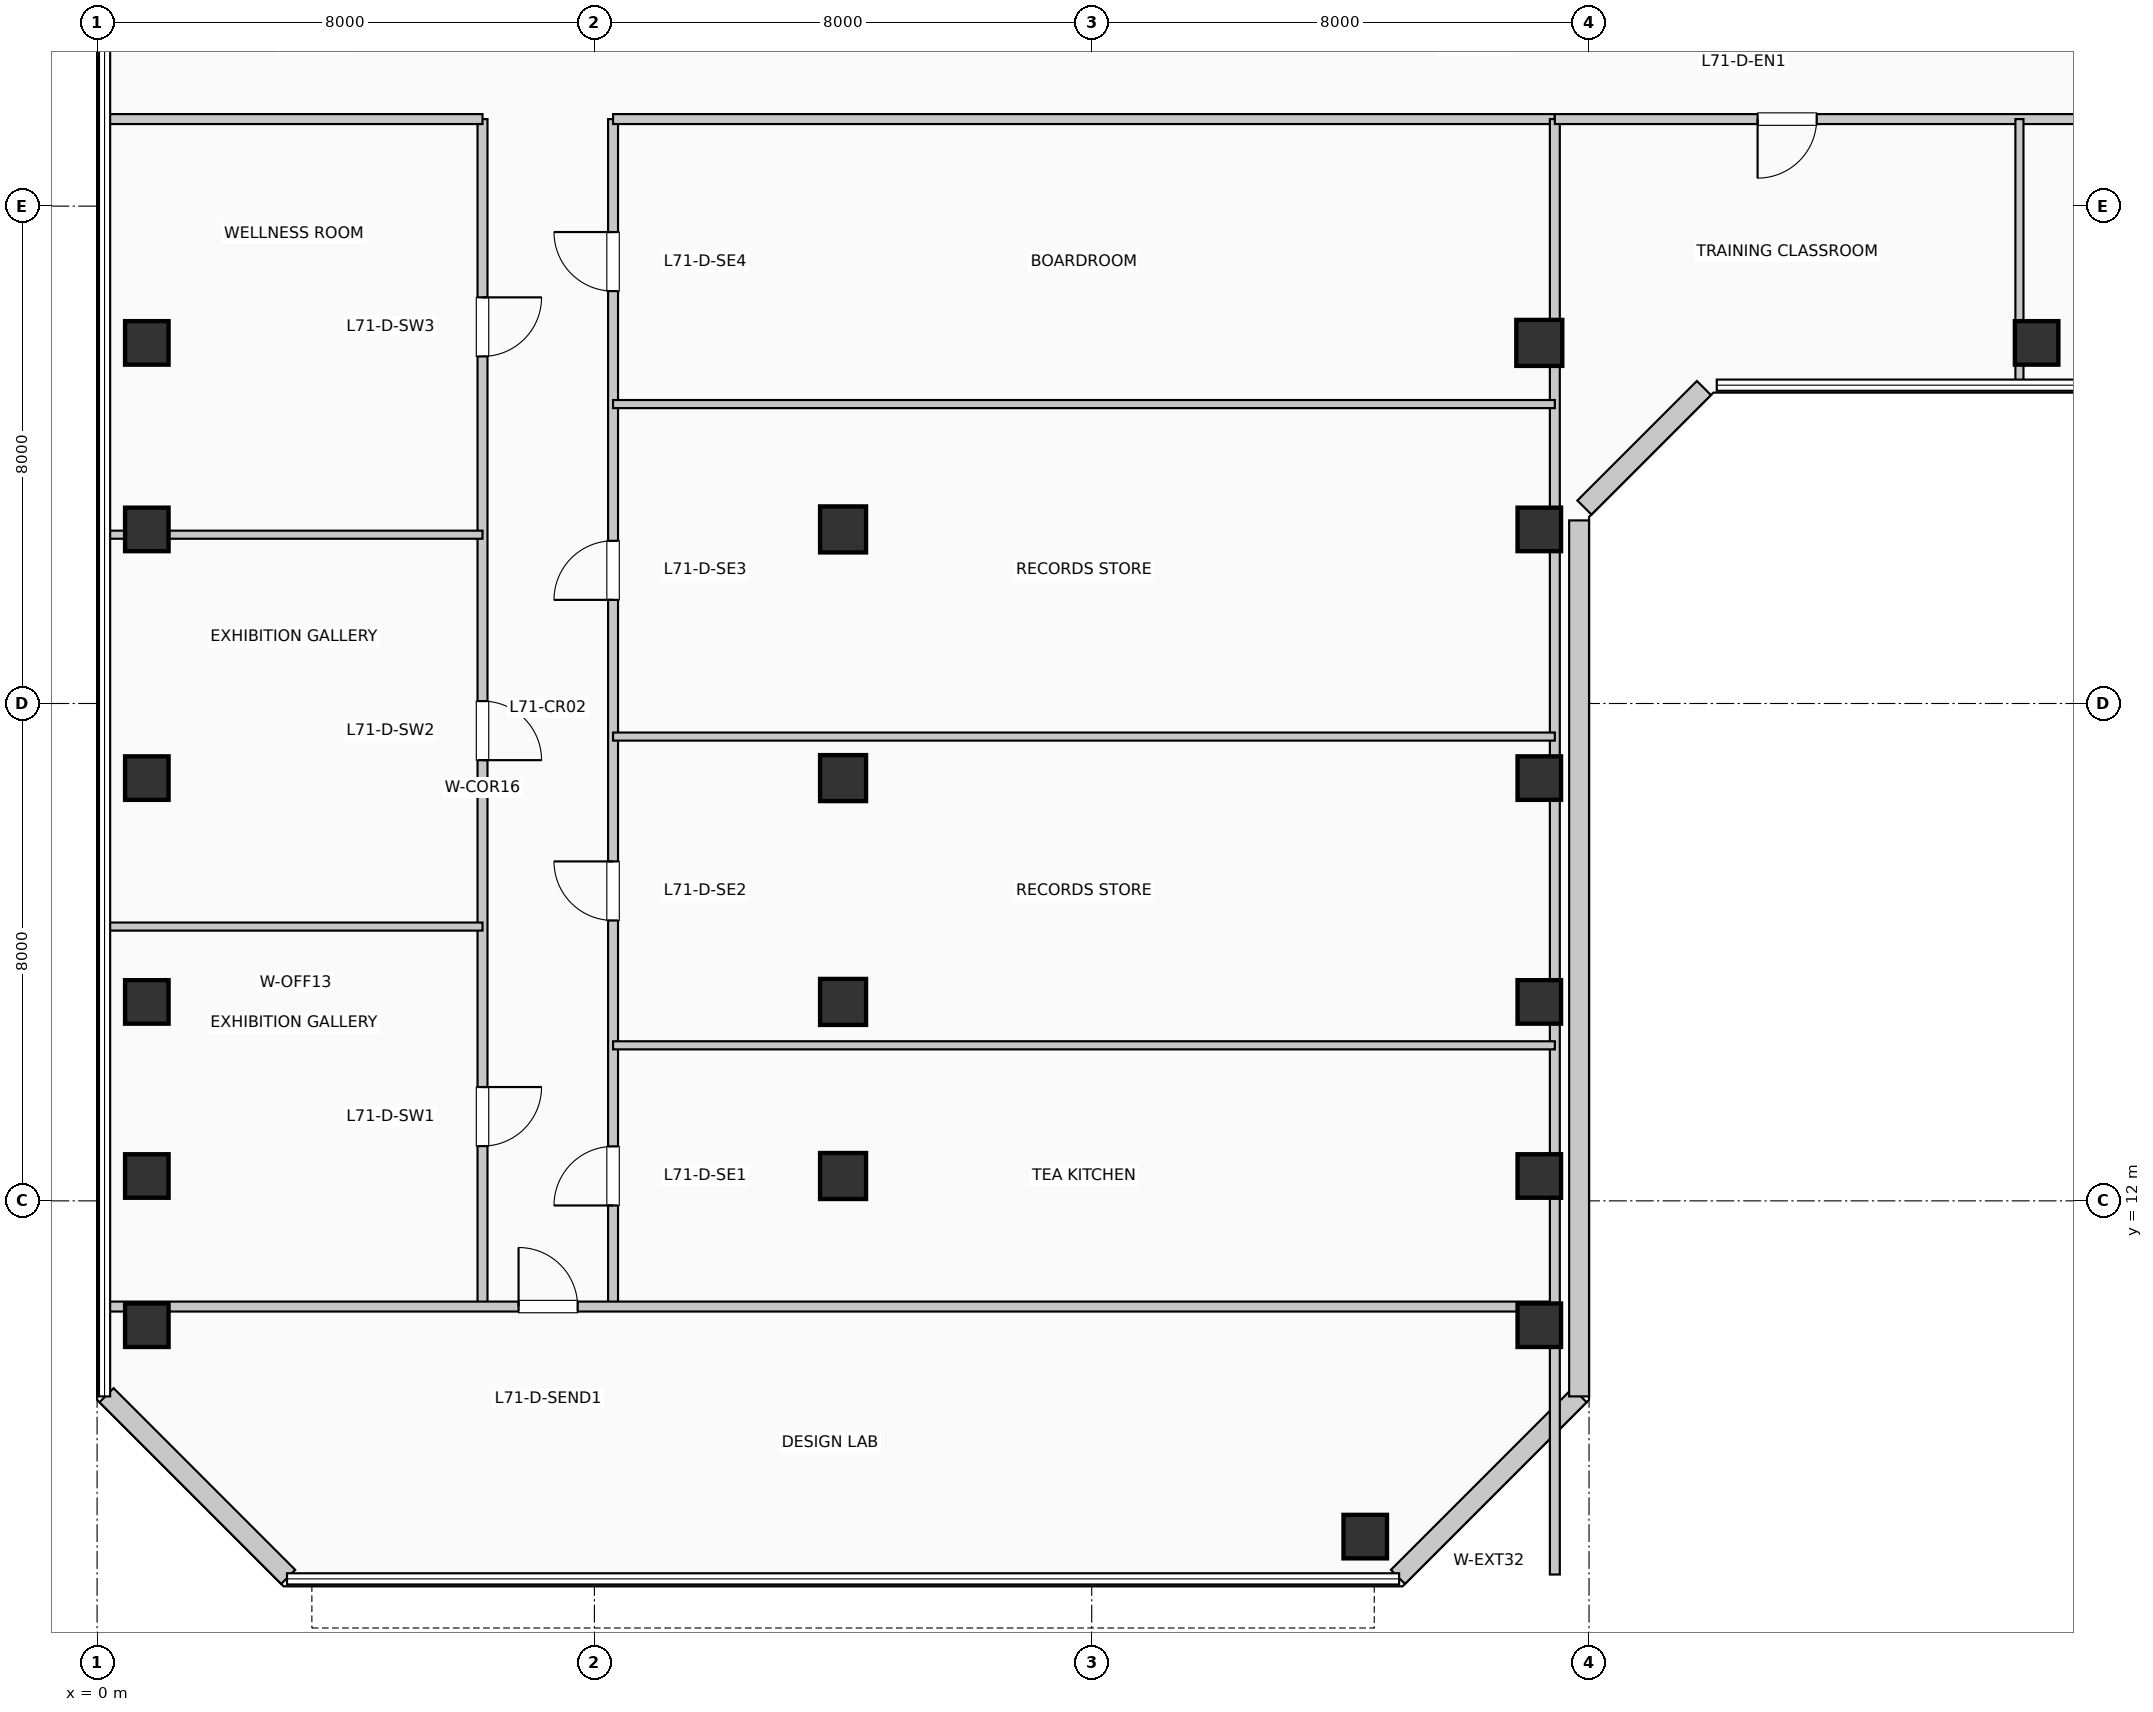
"""IFC4 building model, lengths in metres.
Left out: names, types, materials, properties, quantities, classifications, styles, units other than length and angle.
Written with IfcOpenShell. Run it as: python <this file> out.ifc"""

import sys

from ifc_helpers import new_model, si_unit, direction, frame, frame_2d, origin, origin_2d, place, context, subcontext, project, spatial, rectangle, extrude, element, fill, save


model = new_model("IFC4")
c1 = context("Model", 3, precision=1e-05, world=origin(), true_north=direction((0.0, 1.0)))
c2 = subcontext(c1, "Body", "Model", "MODEL_VIEW")
j1 = project(units=[si_unit("LENGTHUNIT", "METRE"), si_unit("PLANEANGLEUNIT", "RADIAN")], contexts=[c1])
p1 = place(None, origin())
s1 = spatial("IfcSite", under=j1, at=p1, CompositionType="ELEMENT")
p2 = place(p1, origin())
s2 = spatial("IfcBuilding", under=s1, at=p2, CompositionType="ELEMENT")
p3 = place(p2, frame((0.0, 0.0, 292.05)))
s3 = spatial("IfcBuildingStorey", under=s2, at=p3, CompositionType="ELEMENT", Elevation=292.05)
for number, where, z_axis, x_axis in (
    (1, (0.8, 10.0, 0.0), (0.0, 0.0, 1.0), (1.0, 0.0, 0.0)),
    (2, (0.8, 12.4, 0.0), (0.0, 0.0, 1.0), (1.0, 0.0, 0.0)),
    (3, (0.8, 15.2, 0.0), (0.0, 0.0, 1.0), (1.0, 0.0, 0.0)),
    (4, (0.8, 18.8, 0.0), (0.0, 0.0, 1.0), (1.0, 0.0, 0.0)),
    (5, (0.8, 22.8, 0.0), (0.0, 0.0, 1.0), (1.0, 0.0, 0.0)),
    (6, (0.8, 25.8, 0.0), (0.0, 0.0, 1.0), (1.0, 0.0, 0.0)),
):
    element("IfcColumn", number, at=place(p3, frame(where, z_axis=z_axis, x_axis=x_axis)), inside=s3, PredefinedType="COLUMN", context=c2, shape_type="SweptSolid", body=[
        extrude(rectangle(XDim=0.7, YDim=0.7, at=origin_2d()), origin(), (0.0, 0.0, 1.0), 3.96),
    ])
for number, where, z_axis, x_axis in (
    (7, (12.0, 12.4, 0.0), (0.0, 0.0, 1.0), (1.0, 0.0, 0.0)),
    (8, (12.0, 15.2, 0.0), (0.0, 0.0, 1.0), (1.0, 0.0, 0.0)),
    (9, (12.0, 18.8, 0.0), (0.0, 0.0, 1.0), (1.0, 0.0, 0.0)),
    (10, (12.0, 22.8, 0.0), (0.0, 0.0, 1.0), (1.0, 0.0, 0.0)),
):
    element("IfcColumn", number, at=place(p3, frame(where, z_axis=z_axis, x_axis=x_axis)), inside=s3, PredefinedType="COLUMN", context=c2, shape_type="SweptSolid", body=[
        extrude(rectangle(XDim=0.74, YDim=0.74, at=origin_2d()), origin(), (0.0, 0.0, 1.0), 3.96),
    ])
for number, where, z_axis, x_axis in (
    (11, (20.4, 6.6, 0.0), (0.0, 0.0, 1.0), (1.0, 0.0, 0.0)),
    (12, (23.2, 10.0, 0.0), (0.0, 0.0, 1.0), (1.0, 0.0, 0.0)),
    (13, (23.2, 12.4, 0.0), (0.0, 0.0, 1.0), (1.0, 0.0, 0.0)),
    (14, (23.2, 15.2, 0.0), (0.0, 0.0, 1.0), (1.0, 0.0, 0.0)),
    (15, (23.2, 18.8, 0.0), (0.0, 0.0, 1.0), (1.0, 0.0, 0.0)),
    (16, (23.2, 22.8, 0.0), (0.0, 0.0, 1.0), (1.0, 0.0, 0.0)),
):
    element("IfcColumn", number, at=place(p3, frame(where, z_axis=z_axis, x_axis=x_axis)), inside=s3, PredefinedType="COLUMN", context=c2, shape_type="SweptSolid", body=[
        extrude(rectangle(XDim=0.7, YDim=0.7, at=origin_2d()), origin(), (0.0, 0.0, 1.0), 3.96),
    ])
p4 = place(p3, frame((23.2, 25.8, 0.0), z_axis=(0.0, 0.0, 1.0), x_axis=(1.0, 0.0, 0.0)))
e17 = element("IfcColumn", 17, at=p4, inside=s3, PredefinedType="COLUMN", context=c2, shape_type="SweptSolid", body=[
    extrude(rectangle(XDim=0.74, YDim=0.74, at=origin_2d()), origin(), (0.0, 0.0, 1.0), 3.96),
])
p5 = place(p3, frame((31.2, 25.8, 0.0), z_axis=(0.0, 0.0, 1.0), x_axis=(1.0, 0.0, 0.0)))
e18 = element("IfcColumn", 18, at=p5, inside=s3, PredefinedType="COLUMN", context=c2, shape_type="SweptSolid", body=[
    extrude(rectangle(XDim=0.7, YDim=0.7, at=origin_2d()), origin(), (0.0, 0.0, 1.0), 3.96),
])
p6 = place(p3, frame((20.926, 5.952, 0.0), z_axis=(0.0, 0.0, 1.0), x_axis=(0.707077242712, 0.707136318428, 0.0)))
e19 = element("IfcWall", 19, at=p6, inside=s3, PredefinedType="SOLIDWALL", context=c2, shape_type="SweptSolid", body=[
    extrude(rectangle(XDim=4.133, YDim=0.32, at=frame_2d((2.066, 0.0))), origin(), (0.0, 0.0, 1.0), 3.74),
])
p7 = place(p3, frame((23.84, 8.855, 0.0), z_axis=(0.0, 0.0, 1.0), x_axis=(0.0, 1.0, 0.0)))
e20 = element("IfcWall", 20, at=p7, inside=s3, PredefinedType="SOLIDWALL", context=c2, shape_type="SweptSolid", body=[
    extrude(rectangle(XDim=14.09, YDim=0.32, at=frame_2d((7.045, 0.0))), origin(), (0.0, 0.0, 1.0), 3.74),
])
p8 = place(p3, frame((23.926, 23.152, 0.0), z_axis=(0.0, 0.0, 1.0), x_axis=(0.707106781187, 0.707106781187, 0.0)))
e21 = element("IfcWall", 21, at=p8, inside=s3, PredefinedType="SOLIDWALL", context=c2, shape_type="SweptSolid", body=[
    extrude(rectangle(XDim=2.718, YDim=0.32, at=frame_2d((1.359, 0.0))), origin(), (0.0, 0.0, 1.0), 3.74),
])
p9 = place(p3, frame((0.152, 8.874, 0.0), z_axis=(0.0, 0.0, 1.0), x_axis=(0.707077242712, -0.707136318428, 0.0)))
e22 = element("IfcWall", 22, at=p9, inside=s3, PredefinedType="SOLIDWALL", context=c2, shape_type="SweptSolid", body=[
    extrude(rectangle(XDim=4.133, YDim=0.32, at=frame_2d((2.066, 0.0))), origin(), (0.0, 0.0, 1.0), 3.74),
])
p10 = place(p3, frame((6.2, 10.3, 0.0), z_axis=(0.0, 0.0, 1.0), x_axis=(0.0, 1.0, 0.0)))
e23 = element("IfcWall", 23, at=p10, inside=s3, PredefinedType="PARTITIONING", context=c2, shape_type="SweptSolid", body=[
    extrude(rectangle(XDim=19.1, YDim=0.16, at=frame_2d((9.55, 0.0))), origin(), (0.0, 0.0, 1.0), 3.74),
])
p11 = place(p10, frame((3.531, 0.0, 0.0), z_axis=(0.0, 0.0, 1.0), x_axis=(-1.0, 0.0, 0.0)))
e24 = element("IfcOpeningElement", 24, at=p11, cuts=e23, PredefinedType="OPENING", context=c2, shape_type="SweptSolid", body=[
    extrude(rectangle(XDim=0.95, YDim=2.15, at=frame_2d((0.475, 1.075))), frame((0.0, 0.09, 0.0), z_axis=(0.0, -1.0, 0.0), x_axis=(1.0, 0.0, 0.0)), (0.0, 0.0, 1.0), 0.18),
])
p12 = place(p10, frame((9.739, 0.0, 0.0), z_axis=(0.0, 0.0, 1.0), x_axis=(-1.0, 0.0, 0.0)))
e25 = element("IfcOpeningElement", 25, at=p12, cuts=e23, PredefinedType="OPENING", context=c2, shape_type="SweptSolid", body=[
    extrude(rectangle(XDim=0.95, YDim=2.15, at=frame_2d((0.475, 1.075))), frame((0.0, 0.09, 0.0), z_axis=(0.0, -1.0, 0.0), x_axis=(1.0, 0.0, 0.0)), (0.0, 0.0, 1.0), 0.18),
])
p13 = place(p10, frame((16.232, 0.0, 0.0), z_axis=(0.0, 0.0, 1.0), x_axis=(-1.0, 0.0, 0.0)))
e26 = element("IfcOpeningElement", 26, at=p13, cuts=e23, PredefinedType="OPENING", context=c2, shape_type="SweptSolid", body=[
    extrude(rectangle(XDim=0.95, YDim=2.15, at=frame_2d((0.475, 1.075))), frame((0.0, 0.09, 0.0), z_axis=(0.0, -1.0, 0.0), x_axis=(1.0, 0.0, 0.0)), (0.0, 0.0, 1.0), 0.18),
])
p14 = place(p3, frame((8.3, 10.3, 0.0), z_axis=(0.0, 0.0, 1.0), x_axis=(0.0, 1.0, 0.0)))
e27 = element("IfcWall", 27, at=p14, inside=s3, PredefinedType="PARTITIONING", context=c2, shape_type="SweptSolid", body=[
    extrude(rectangle(XDim=19.1, YDim=0.16, at=frame_2d((9.55, 0.0))), origin(), (0.0, 0.0, 1.0), 3.74),
])
p15 = place(p14, frame((1.626, 0.0, 0.0)))
e28 = element("IfcOpeningElement", 28, at=p15, cuts=e27, PredefinedType="OPENING", context=c2, shape_type="SweptSolid", body=[
    extrude(rectangle(XDim=0.95, YDim=2.15, at=frame_2d((0.475, 1.075))), frame((0.0, 0.09, 0.0), z_axis=(0.0, -1.0, 0.0), x_axis=(1.0, 0.0, 0.0)), (0.0, 0.0, 1.0), 0.18),
])
p16 = place(p14, frame((6.21, 0.0, 0.0)))
e29 = element("IfcOpeningElement", 29, at=p16, cuts=e27, PredefinedType="OPENING", context=c2, shape_type="SweptSolid", body=[
    extrude(rectangle(XDim=0.95, YDim=2.15, at=frame_2d((0.475, 1.075))), frame((0.0, 0.09, 0.0), z_axis=(0.0, -1.0, 0.0), x_axis=(1.0, 0.0, 0.0)), (0.0, 0.0, 1.0), 0.18),
])
p17 = place(p14, frame((11.367, 0.0, 0.0)))
e30 = element("IfcOpeningElement", 30, at=p17, cuts=e27, PredefinedType="OPENING", context=c2, shape_type="SweptSolid", body=[
    extrude(rectangle(XDim=0.95, YDim=2.15, at=frame_2d((0.475, 1.075))), frame((0.0, 0.09, 0.0), z_axis=(0.0, -1.0, 0.0), x_axis=(1.0, 0.0, 0.0)), (0.0, 0.0, 1.0), 0.18),
])
p18 = place(p14, frame((16.333, 0.0, 0.0)))
e31 = element("IfcOpeningElement", 31, at=p18, cuts=e27, PredefinedType="OPENING", context=c2, shape_type="SweptSolid", body=[
    extrude(rectangle(XDim=0.95, YDim=2.15, at=frame_2d((0.475, 1.075))), frame((0.0, 0.09, 0.0), z_axis=(0.0, -1.0, 0.0), x_axis=(1.0, 0.0, 0.0)), (0.0, 0.0, 1.0), 0.18),
])
p19 = place(p3, frame((0.19, 10.3, 0.0), z_axis=(0.0, 0.0, 1.0), x_axis=(1.0, 0.0, 0.0)))
e32 = element("IfcWall", 32, at=p19, inside=s3, PredefinedType="PARTITIONING", context=c2, shape_type="SweptSolid", body=[
    extrude(rectangle(XDim=23.26, YDim=0.16, at=frame_2d((11.63, 0.0))), origin(), (0.0, 0.0, 1.0), 3.175),
])
p20 = place(p19, frame((6.59, 0.0, 0.0)))
e33 = element("IfcOpeningElement", 33, at=p20, cuts=e32, PredefinedType="OPENING", context=c2, shape_type="SweptSolid", body=[
    extrude(rectangle(XDim=0.95, YDim=2.15, at=frame_2d((0.475, 1.075))), frame((0.0, 0.09, 0.0), z_axis=(0.0, -1.0, 0.0), x_axis=(1.0, 0.0, 0.0)), (0.0, 0.0, 1.0), 0.18),
])
p21 = place(p3, frame((0.19, 29.4, 0.0), z_axis=(0.0, 0.0, 1.0), x_axis=(1.0, 0.0, 0.0)))
e34 = element("IfcWall", 34, at=p21, inside=s3, PredefinedType="PARTITIONING", context=c2, shape_type="SweptSolid", body=[
    extrude(rectangle(XDim=6.01, YDim=0.16, at=frame_2d((3.005, 0.0))), origin(), (0.0, 0.0, 1.0), 3.425),
])
p22 = place(p3, frame((8.3, 29.4, 0.0), z_axis=(0.0, 0.0, 1.0), x_axis=(1.0, 0.0, 0.0)))
e35 = element("IfcWall", 35, at=p22, inside=s3, PredefinedType="PARTITIONING", context=c2, shape_type="SweptSolid", body=[
    extrude(rectangle(XDim=15.15, YDim=0.16, at=frame_2d((7.575, 0.0))), origin(), (0.0, 0.0, 1.0), 3.425),
])
p23 = place(p3, frame((23.45, 5.99, 0.0), z_axis=(0.0, 0.0, 1.0), x_axis=(0.0, 1.0, 0.0)))
e36 = element("IfcWall", 36, at=p23, inside=s3, PredefinedType="PARTITIONING", context=c2, shape_type="SweptSolid", body=[
    extrude(rectangle(XDim=23.41, YDim=0.16, at=frame_2d((11.705, 0.0))), origin(), (0.0, 0.0, 1.0), 3.175),
])
p24 = place(p3, frame((0.19, 16.412, 0.0), z_axis=(0.0, 0.0, 1.0), x_axis=(1.0, 0.0, 0.0)))
e37 = element("IfcWall", 37, at=p24, inside=s3, PredefinedType="PARTITIONING", context=c2, shape_type="SweptSolid", body=[
    extrude(rectangle(XDim=6.01, YDim=0.13, at=frame_2d((3.005, 0.0))), origin(), (0.0, 0.0, 1.0), 3.74),
])
p25 = place(p3, frame((0.19, 22.715, 0.0), z_axis=(0.0, 0.0, 1.0), x_axis=(1.0, 0.0, 0.0)))
e38 = element("IfcWall", 38, at=p25, inside=s3, PredefinedType="PARTITIONING", context=c2, shape_type="SweptSolid", body=[
    extrude(rectangle(XDim=6.01, YDim=0.13, at=frame_2d((3.005, 0.0))), origin(), (0.0, 0.0, 1.0), 3.175),
])
for number, where, z_axis, x_axis in (
    (39, (8.3, 14.502, 0.0), (0.0, 0.0, 1.0), (1.0, 0.0, 0.0)),
    (40, (8.3, 19.468, 0.0), (0.0, 0.0, 1.0), (1.0, 0.0, 0.0)),
    (41, (8.3, 24.816, 0.0), (0.0, 0.0, 1.0), (1.0, 0.0, 0.0)),
):
    element("IfcWall", number, at=place(p3, frame(where, z_axis=z_axis, x_axis=x_axis)), inside=s3, PredefinedType="PARTITIONING", context=c2, shape_type="SweptSolid", body=[
        extrude(rectangle(XDim=15.15, YDim=0.13, at=frame_2d((7.575, 0.0))), origin(), (0.0, 0.0, 1.0), 3.74),
    ])
p26 = place(p3, frame((23.45, 29.4, 0.0), z_axis=(0.0, 0.0, 1.0), x_axis=(1.0, 0.0, 0.0)))
e42 = element("IfcWall", 42, at=p26, inside=s3, PredefinedType="PARTITIONING", context=c2, shape_type="SweptSolid", body=[
    extrude(rectangle(XDim=20.76, YDim=0.16, at=frame_2d((10.38, 0.0))), origin(), (0.0, 0.0, 1.0), 3.425),
])
p27 = place(p26, frame((4.212, 0.0, 0.0), z_axis=(0.0, 0.0, 1.0), x_axis=(-1.0, 0.0, 0.0)))
e43 = element("IfcOpeningElement", 43, at=p27, cuts=e42, PredefinedType="OPENING", context=c2, shape_type="SweptSolid", body=[
    extrude(rectangle(XDim=0.95, YDim=2.15, at=frame_2d((0.475, 1.075))), frame((0.0, 0.09, 0.0), z_axis=(0.0, -1.0, 0.0), x_axis=(1.0, 0.0, 0.0)), (0.0, 0.0, 1.0), 0.18),
])
p28 = place(p26, frame((11.478, 0.0, 0.0), z_axis=(0.0, 0.0, 1.0), x_axis=(-1.0, 0.0, 0.0)))
e44 = element("IfcOpeningElement", 44, at=p28, cuts=e42, PredefinedType="OPENING", context=c2, shape_type="SweptSolid", body=[
    extrude(rectangle(XDim=0.95, YDim=2.15, at=frame_2d((0.475, 1.075))), frame((0.0, 0.09, 0.0), z_axis=(0.0, -1.0, 0.0), x_axis=(1.0, 0.0, 0.0)), (0.0, 0.0, 1.0), 0.18),
])
p29 = place(p26, frame((18.121, 0.0, 0.0), z_axis=(0.0, 0.0, 1.0), x_axis=(-1.0, 0.0, 0.0)))
e45 = element("IfcOpeningElement", 45, at=p29, cuts=e42, PredefinedType="OPENING", context=c2, shape_type="SweptSolid", body=[
    extrude(rectangle(XDim=0.95, YDim=2.15, at=frame_2d((0.475, 1.075))), frame((0.0, 0.09, 0.0), z_axis=(0.0, -1.0, 0.0), x_axis=(1.0, 0.0, 0.0)), (0.0, 0.0, 1.0), 0.18),
])
p30 = place(p3, frame((30.924, 25.19, 0.0), z_axis=(0.0, 0.0, 1.0), x_axis=(0.0, 1.0, 0.0)))
e46 = element("IfcWall", 46, at=p30, inside=s3, PredefinedType="PARTITIONING", context=c2, shape_type="SweptSolid", body=[
    extrude(rectangle(XDim=4.21, YDim=0.13, at=frame_2d((2.105, 0.0))), origin(), (0.0, 0.0, 1.0), 3.175),
])
p31 = place(p20, origin())
e47 = element("IfcDoor", 47, at=p31, inside=s3, OperationType="SINGLE_SWING_LEFT", PredefinedType="DOOR", context=c2, shape_type="SweptSolid", body=[
    extrude(rectangle(XDim=0.95, YDim=2.15, at=frame_2d((0.475, 1.075))), frame((0.0, 0.025, 0.0), z_axis=(0.0, -1.0, 0.0), x_axis=(1.0, 0.0, 0.0)), (0.0, 0.0, 1.0), 0.05),
])
fill(e33, e47)
p32 = place(p11, origin())
e48 = element("IfcDoor", 48, at=p32, inside=s3, OperationType="SINGLE_SWING_RIGHT", PredefinedType="DOOR", context=c2, shape_type="SweptSolid", body=[
    extrude(rectangle(XDim=0.95, YDim=2.15, at=frame_2d((0.475, 1.075))), frame((0.0, 0.025, 0.0), z_axis=(0.0, -1.0, 0.0), x_axis=(1.0, 0.0, 0.0)), (0.0, 0.0, 1.0), 0.05),
])
fill(e24, e48)
p33 = place(p12, origin())
e49 = element("IfcDoor", 49, at=p33, inside=s3, OperationType="SINGLE_SWING_LEFT", PredefinedType="DOOR", context=c2, shape_type="SweptSolid", body=[
    extrude(rectangle(XDim=0.95, YDim=2.15, at=frame_2d((0.475, 1.075))), frame((0.0, 0.025, 0.0), z_axis=(0.0, -1.0, 0.0), x_axis=(1.0, 0.0, 0.0)), (0.0, 0.0, 1.0), 0.05),
])
fill(e25, e49)
p34 = place(p13, origin())
e50 = element("IfcDoor", 50, at=p34, inside=s3, OperationType="SINGLE_SWING_RIGHT", PredefinedType="DOOR", context=c2, shape_type="SweptSolid", body=[
    extrude(rectangle(XDim=0.95, YDim=2.15, at=frame_2d((0.475, 1.075))), frame((0.0, 0.025, 0.0), z_axis=(0.0, -1.0, 0.0), x_axis=(1.0, 0.0, 0.0)), (0.0, 0.0, 1.0), 0.05),
])
fill(e26, e50)
p35 = place(p15, origin())
e51 = element("IfcDoor", 51, at=p35, inside=s3, OperationType="SINGLE_SWING_LEFT", PredefinedType="DOOR", context=c2, shape_type="SweptSolid", body=[
    extrude(rectangle(XDim=0.95, YDim=2.15, at=frame_2d((0.475, 1.075))), frame((0.0, 0.025, 0.0), z_axis=(0.0, -1.0, 0.0), x_axis=(1.0, 0.0, 0.0)), (0.0, 0.0, 1.0), 0.05),
])
fill(e28, e51)
p36 = place(p16, origin())
e52 = element("IfcDoor", 52, at=p36, inside=s3, OperationType="SINGLE_SWING_RIGHT", PredefinedType="DOOR", context=c2, shape_type="SweptSolid", body=[
    extrude(rectangle(XDim=0.95, YDim=2.15, at=frame_2d((0.475, 1.075))), frame((0.0, 0.025, 0.0), z_axis=(0.0, -1.0, 0.0), x_axis=(1.0, 0.0, 0.0)), (0.0, 0.0, 1.0), 0.05),
])
fill(e29, e52)
p37 = place(p17, origin())
e53 = element("IfcDoor", 53, at=p37, inside=s3, OperationType="SINGLE_SWING_LEFT", PredefinedType="DOOR", context=c2, shape_type="SweptSolid", body=[
    extrude(rectangle(XDim=0.95, YDim=2.15, at=frame_2d((0.475, 1.075))), frame((0.0, 0.025, 0.0), z_axis=(0.0, -1.0, 0.0), x_axis=(1.0, 0.0, 0.0)), (0.0, 0.0, 1.0), 0.05),
])
fill(e30, e53)
p38 = place(p18, origin())
e54 = element("IfcDoor", 54, at=p38, inside=s3, OperationType="SINGLE_SWING_RIGHT", PredefinedType="DOOR", context=c2, shape_type="SweptSolid", body=[
    extrude(rectangle(XDim=0.95, YDim=2.15, at=frame_2d((0.475, 1.075))), frame((0.0, 0.025, 0.0), z_axis=(0.0, -1.0, 0.0), x_axis=(1.0, 0.0, 0.0)), (0.0, 0.0, 1.0), 0.05),
])
fill(e31, e54)
p39 = place(p27, origin())
e55 = element("IfcDoor", 55, at=p39, inside=s3, OperationType="SINGLE_SWING_LEFT", PredefinedType="DOOR", context=c2, shape_type="SweptSolid", body=[
    extrude(rectangle(XDim=0.95, YDim=2.15, at=frame_2d((0.475, 1.075))), frame((0.0, 0.025, 0.0), z_axis=(0.0, -1.0, 0.0), x_axis=(1.0, 0.0, 0.0)), (0.0, 0.0, 1.0), 0.05),
])
fill(e43, e55)
save(model, sys.argv[1])
